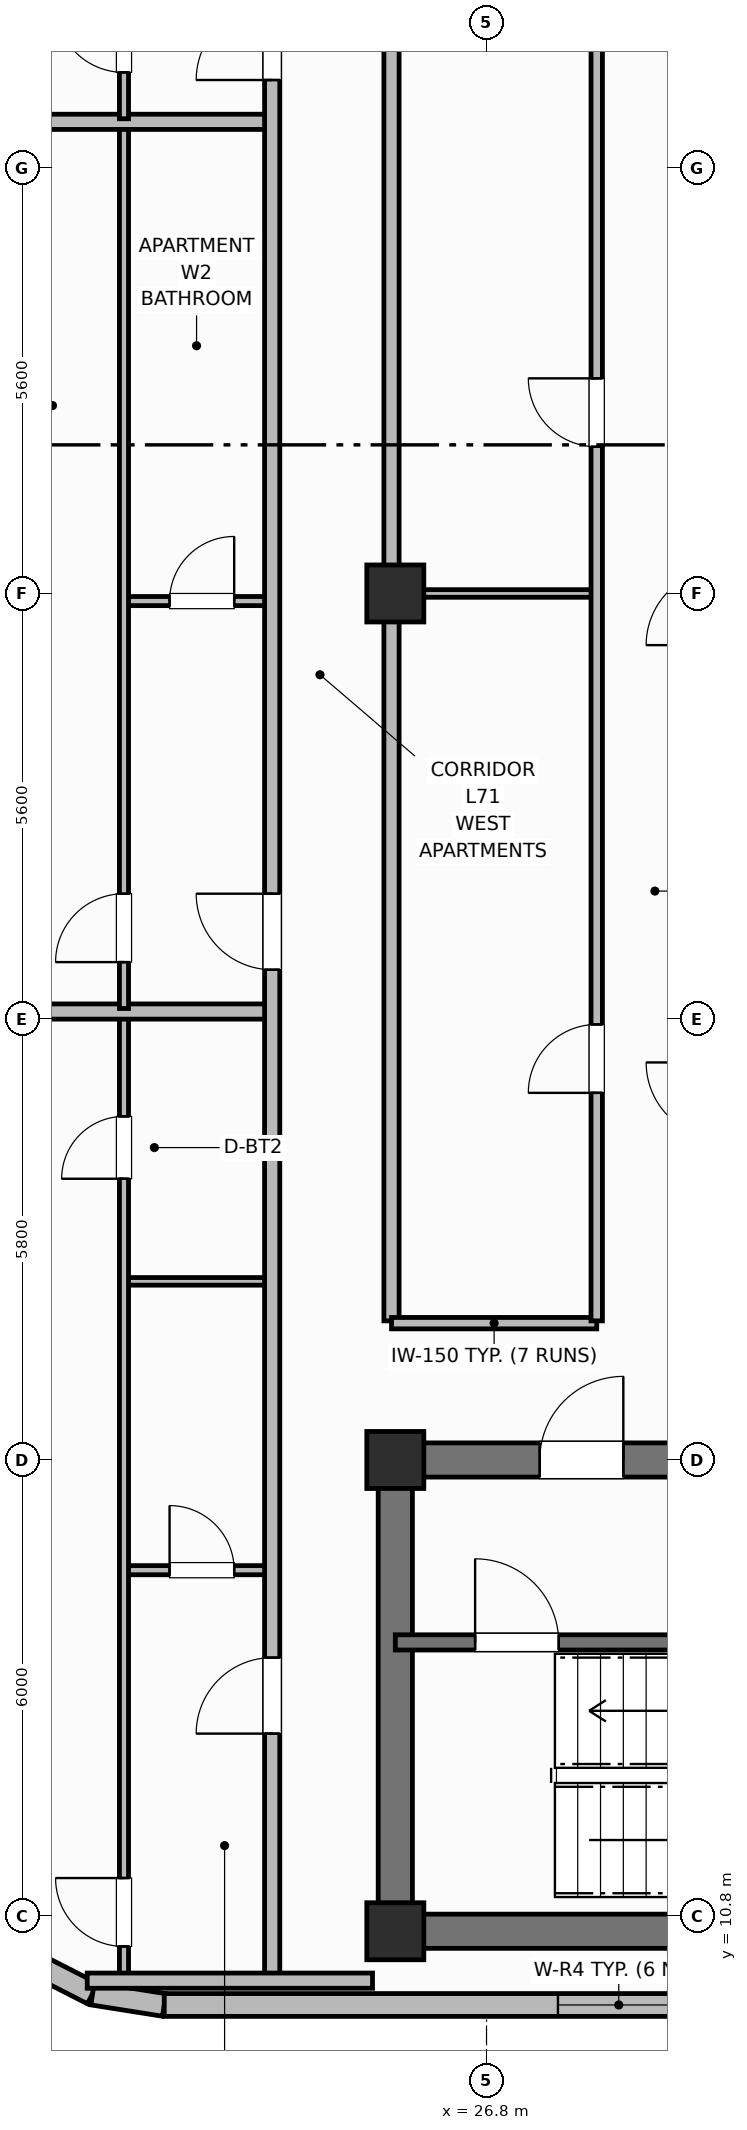
"""IFC4 building model, lengths in metres.
Left out: names, types, materials, properties, quantities, classifications, styles, units other than length and angle.
Written with IfcOpenShell. Run it as: python <this file> out.ifc"""

import sys

from ifc_helpers import new_model, si_unit, direction, frame, frame_2d, origin, origin_2d, place, context, subcontext, project, spatial, rectangle, extrude, element, fill, save


model = new_model("IFC4")
c1 = context("Model", 3, precision=1e-05, world=origin(), true_north=direction((0.0, 1.0)))
c2 = subcontext(c1, "Body", "Model", "MODEL_VIEW")
j1 = project(units=[si_unit("LENGTHUNIT", "METRE"), si_unit("PLANEANGLEUNIT", "RADIAN")], contexts=[c1])
p1 = place(None, origin())
s1 = spatial("IfcSite", under=j1, at=p1, CompositionType="ELEMENT")
p2 = place(p1, origin())
s2 = spatial("IfcBuilding", under=s1, at=p2, CompositionType="ELEMENT")
p3 = place(p2, frame((0.0, 0.0, 282.4)))
s3 = spatial("IfcBuildingStorey", under=s2, at=p3, CompositionType="ELEMENT", Elevation=282.4)
p4 = place(p3, frame((52.8, 10.6, 0.0), z_axis=(0.0, 0.0, 1.0), x_axis=(-1.0, 0.0, 0.0)))
e1 = element("IfcWall", 1, at=p4, inside=s3, PredefinedType="SHEAR", context=c2, shape_type="SweptSolid", body=[
    extrude(rectangle(XDim=27.2, YDim=0.45, at=frame_2d((13.6, 0.0))), origin(), (0.0, 0.0, 1.0), 3.7),
])
p5 = place(p3, frame((25.6, 10.825, 0.0), z_axis=(0.0, 0.0, 1.0), x_axis=(0.0, 1.0, 0.0)))
e2 = element("IfcWall", 2, at=p5, inside=s3, PredefinedType="SHEAR", context=c2, shape_type="SweptSolid", body=[
    extrude(rectangle(XDim=5.75, YDim=0.45, at=frame_2d((2.875, 0.0))), origin(), (0.0, 0.0, 1.0), 3.7),
])
p6 = place(p3, frame((25.6, 16.8, 0.0), z_axis=(0.0, 0.0, 1.0), x_axis=(1.0, 0.0, 0.0)))
e3 = element("IfcWall", 3, at=p6, inside=s3, PredefinedType="SHEAR", context=c2, shape_type="SweptSolid", body=[
    extrude(rectangle(XDim=27.2, YDim=0.45, at=frame_2d((13.6, 0.0))), origin(), (0.0, 0.0, 1.0), 3.7),
])
p7 = place(p6, frame((1.9, 0.0, 0.0)))
e4 = element("IfcOpeningElement", 4, at=p7, cuts=e3, PredefinedType="OPENING", context=c2, shape_type="SweptSolid", body=[
    extrude(rectangle(XDim=1.1, YDim=2.15, at=frame_2d((0.55, 1.075))), frame((0.0, 0.235, 0.0), z_axis=(0.0, -1.0, 0.0), x_axis=(1.0, 0.0, 0.0)), (0.0, 0.0, 1.0), 0.47),
])
p8 = place(p6, frame((13.0, 0.0, 0.0)))
e5 = element("IfcOpeningElement", 5, at=p8, cuts=e3, PredefinedType="OPENING", context=c2, shape_type="SweptSolid", body=[
    extrude(rectangle(XDim=1.2, YDim=2.15, at=frame_2d((0.6, 1.075))), frame((0.0, 0.235, 0.0), z_axis=(0.0, -1.0, 0.0), x_axis=(1.0, 0.0, 0.0)), (0.0, 0.0, 1.0), 0.47),
])
p9 = place(p6, frame((21.6, 0.0, 0.0)))
e6 = element("IfcOpeningElement", 6, at=p9, cuts=e3, PredefinedType="OPENING", context=c2, shape_type="SweptSolid", body=[
    extrude(rectangle(XDim=1.0, YDim=2.15, at=frame_2d((0.5, 1.075))), frame((0.0, 0.235, 0.0), z_axis=(0.0, -1.0, 0.0), x_axis=(1.0, 0.0, 0.0)), (0.0, 0.0, 1.0), 0.47),
])
for number, where, z_axis, x_axis in (
    (7, (25.6, 10.6, 0.0), (0.0, 0.0, 1.0), (1.0, 0.0, 0.0)),
    (8, (25.6, 16.8, 0.0), (0.0, 0.0, 1.0), (1.0, 0.0, 0.0)),
    (9, (25.6, 28.2, 0.0), (0.0, 0.0, 1.0), (1.0, 0.0, 0.0)),
):
    element("IfcColumn", number, at=place(p3, frame(where, z_axis=z_axis, x_axis=x_axis)), inside=s3, PredefinedType="COLUMN", context=c2, shape_type="SweptSolid", body=[
        extrude(rectangle(XDim=0.75, YDim=0.75, at=origin_2d()), origin(), (0.0, 0.0, 1.0), 3.7),
    ])
p10 = place(p3, frame((20.767, 10.212, 0.0), z_axis=(0.0, 0.0, 1.0), x_axis=(0.891023873617, -0.45395644796, 0.0)))
e10 = element("IfcWall", 10, at=p10, inside=s3, PredefinedType="SOLIDWALL", context=c2, shape_type="SweptSolid", body=[
    extrude(rectangle(XDim=0.954, YDim=0.3, at=frame_2d((0.477, 0.0))), origin(), (0.0, 0.0, 1.0), 2.73),
])
p11 = place(p3, frame((21.617, 9.779, 0.0), z_axis=(0.0, 0.0, 1.0), x_axis=(0.987669453596, -0.156553666304, 0.0)))
e11 = element("IfcWall", 11, at=p11, inside=s3, PredefinedType="SOLIDWALL", context=c2, shape_type="SweptSolid", body=[
    extrude(rectangle(XDim=0.954, YDim=0.3, at=frame_2d((0.477, 0.0))), origin(), (0.0, 0.0, 1.0), 2.73),
])
p12 = place(p3, frame((22.56, 9.63, 0.0), z_axis=(0.0, 0.0, 1.0), x_axis=(1.0, 0.0, 0.0)))
e12 = element("IfcWall", 12, at=p12, inside=s3, PredefinedType="SOLIDWALL", context=c2, shape_type="SweptSolid", body=[
    extrude(rectangle(XDim=33.28, YDim=0.3, at=frame_2d((16.64, 0.0))), origin(), (0.0, 0.0, 1.0), 2.73),
])
p13 = place(p12, frame((5.18, 0.0, 0.71)))
e13 = element("IfcOpeningElement", 13, at=p13, cuts=e12, PredefinedType="OPENING", context=c2, shape_type="SweptSolid", body=[
    extrude(rectangle(XDim=1.6, YDim=1.9, at=frame_2d((0.8, 0.95))), frame((0.0, 0.16, 0.0), z_axis=(0.0, -1.0, 0.0), x_axis=(1.0, 0.0, 0.0)), (0.0, 0.0, 1.0), 0.32),
])
p14 = place(p12, frame((8.733, 0.0, 0.71)))
e14 = element("IfcOpeningElement", 14, at=p14, cuts=e12, PredefinedType="OPENING", context=c2, shape_type="SweptSolid", body=[
    extrude(rectangle(XDim=1.6, YDim=1.9, at=frame_2d((0.8, 0.95))), frame((0.0, 0.16, 0.0), z_axis=(0.0, -1.0, 0.0), x_axis=(1.0, 0.0, 0.0)), (0.0, 0.0, 1.0), 0.32),
])
p15 = place(p12, frame((15.84, 0.0, 0.71)))
e15 = element("IfcOpeningElement", 15, at=p15, cuts=e12, PredefinedType="OPENING", context=c2, shape_type="SweptSolid", body=[
    extrude(rectangle(XDim=1.6, YDim=1.9, at=frame_2d((0.8, 0.95))), frame((0.0, 0.16, 0.0), z_axis=(0.0, -1.0, 0.0), x_axis=(1.0, 0.0, 0.0)), (0.0, 0.0, 1.0), 0.32),
])
p16 = place(p12, frame((22.947, 0.0, 0.71)))
e16 = element("IfcOpeningElement", 16, at=p16, cuts=e12, PredefinedType="OPENING", context=c2, shape_type="SweptSolid", body=[
    extrude(rectangle(XDim=1.6, YDim=1.9, at=frame_2d((0.8, 0.95))), frame((0.0, 0.16, 0.0), z_axis=(0.0, -1.0, 0.0), x_axis=(1.0, 0.0, 0.0)), (0.0, 0.0, 1.0), 0.32),
])
p17 = place(p12, frame((26.5, 0.0, 0.71)))
e17 = element("IfcOpeningElement", 17, at=p17, cuts=e12, PredefinedType="OPENING", context=c2, shape_type="SweptSolid", body=[
    extrude(rectangle(XDim=1.6, YDim=1.9, at=frame_2d((0.8, 0.95))), frame((0.0, 0.16, 0.0), z_axis=(0.0, -1.0, 0.0), x_axis=(1.0, 0.0, 0.0)), (0.0, 0.0, 1.0), 0.32),
])
p18 = place(p3, frame((25.6, 14.4, 0.0), z_axis=(0.0, 0.0, 1.0), x_axis=(1.0, 0.0, 0.0)))
e18 = element("IfcWall", 18, at=p18, inside=s3, PredefinedType="SHEAR", context=c2, shape_type="SweptSolid", body=[
    extrude(rectangle(XDim=9.55, YDim=0.2, at=frame_2d((4.775, 0.0))), origin(), (0.0, 0.0, 1.0), 3.7),
])
p19 = place(p18, frame((1.05, 0.0, 0.0)))
e19 = element("IfcOpeningElement", 19, at=p19, cuts=e18, PredefinedType="OPENING", context=c2, shape_type="SweptSolid", body=[
    extrude(rectangle(XDim=1.1, YDim=2.15, at=frame_2d((0.55, 1.075))), frame((0.0, 0.11, 0.0), z_axis=(0.0, -1.0, 0.0), x_axis=(1.0, 0.0, 0.0)), (0.0, 0.0, 1.0), 0.22),
])
p20 = place(p3, frame((25.55, 18.63, 0.0), z_axis=(0.0, 0.0, 1.0), x_axis=(0.0, 1.0, 0.0)))
e20 = element("IfcWall", 20, at=p20, inside=s3, PredefinedType="PARTITIONING", context=c2, shape_type="SweptSolid", body=[
    extrude(rectangle(XDim=19.14, YDim=0.2, at=frame_2d((9.57, 0.0))), origin(), (0.0, 0.0, 1.0), 2.56),
])
p21 = place(p3, frame((25.55, 18.6, 0.0), z_axis=(0.0, 0.0, 1.0), x_axis=(1.0, 0.0, 0.0)))
e21 = element("IfcWall", 21, at=p21, inside=s3, PredefinedType="PARTITIONING", context=c2, shape_type="SweptSolid", body=[
    extrude(rectangle(XDim=2.7, YDim=0.15, at=frame_2d((1.35, 0.0))), origin(), (0.0, 0.0, 1.0), 2.56),
])
p22 = place(p3, frame((25.6, 28.2, 0.0), z_axis=(0.0, 0.0, 1.0), x_axis=(1.0, 0.0, 0.0)))
e22 = element("IfcWall", 22, at=p22, inside=s3, PredefinedType="PARTITIONING", context=c2, shape_type="SweptSolid", body=[
    extrude(rectangle(XDim=2.66, YDim=0.1, at=frame_2d((1.33, 0.0))), origin(), (0.0, 0.0, 1.0), 2.56),
])
p23 = place(p3, frame((28.25, 18.63, 0.0), z_axis=(0.0, 0.0, 1.0), x_axis=(0.0, 1.0, 0.0)))
e23 = element("IfcWall", 23, at=p23, inside=s3, PredefinedType="PARTITIONING", context=c2, shape_type="SweptSolid", body=[
    extrude(rectangle(XDim=19.14, YDim=0.15, at=frame_2d((9.57, 0.0))), origin(), (0.0, 0.0, 1.0), 2.56),
])
p24 = place(p23, frame((3.0, 0.0, 0.0)))
e24 = element("IfcOpeningElement", 24, at=p24, cuts=e23, PredefinedType="OPENING", context=c2, shape_type="SweptSolid", body=[
    extrude(rectangle(XDim=0.9, YDim=2.1, at=frame_2d((0.45, 1.05))), frame((0.0, 0.085, 0.0), z_axis=(0.0, -1.0, 0.0), x_axis=(1.0, 0.0, 0.0)), (0.0, 0.0, 1.0), 0.17),
])
p25 = place(p23, frame((11.5, 0.0, 0.0)))
e25 = element("IfcOpeningElement", 25, at=p25, cuts=e23, PredefinedType="OPENING", context=c2, shape_type="SweptSolid", body=[
    extrude(rectangle(XDim=0.9, YDim=2.1, at=frame_2d((0.45, 1.05))), frame((0.0, 0.085, 0.0), z_axis=(0.0, -1.0, 0.0), x_axis=(1.0, 0.0, 0.0)), (0.0, 0.0, 1.0), 0.17),
])
p26 = place(p3, frame((22.03, 15.35, 0.0), z_axis=(0.0, 0.0, 1.0), x_axis=(1.0, 0.0, 0.0)))
e26 = element("IfcWall", 26, at=p26, inside=s3, PredefinedType="PARTITIONING", context=c2, shape_type="SweptSolid", body=[
    extrude(rectangle(XDim=1.95, YDim=0.12, at=frame_2d((0.975, 0.0))), origin(), (0.0, 0.0, 1.0), 2.56),
])
p27 = place(p26, frame((0.6, 0.0, 0.0)))
e27 = element("IfcOpeningElement", 27, at=p27, cuts=e26, PredefinedType="OPENING", context=c2, shape_type="SweptSolid", body=[
    extrude(rectangle(XDim=0.85, YDim=2.1, at=frame_2d((0.425, 1.05))), frame((0.0, 0.07, 0.0), z_axis=(0.0, -1.0, 0.0), x_axis=(1.0, 0.0, 0.0)), (0.0, 0.0, 1.0), 0.14),
])
p28 = place(p3, frame((22.03, 19.15, 0.0), z_axis=(0.0, 0.0, 1.0), x_axis=(1.0, 0.0, 0.0)))
e28 = element("IfcWall", 28, at=p28, inside=s3, PredefinedType="PARTITIONING", context=c2, shape_type="SweptSolid", body=[
    extrude(rectangle(XDim=1.95, YDim=0.1, at=frame_2d((0.975, 0.0))), origin(), (0.0, 0.0, 1.0), 2.56),
])
p29 = place(p3, frame((22.03, 9.99, 0.0), z_axis=(0.0, 0.0, 1.0), x_axis=(0.0, 1.0, 0.0)))
e29 = element("IfcWall", 29, at=p29, inside=s3, PredefinedType="PARTITIONING", context=c2, shape_type="SweptSolid", body=[
    extrude(rectangle(XDim=12.67, YDim=0.12, at=frame_2d((6.335, 0.0))), origin(), (0.0, 0.0, 1.0), 2.56),
])
p30 = place(p29, frame((0.41, 0.0, 0.0)))
e30 = element("IfcOpeningElement", 30, at=p30, cuts=e29, PredefinedType="OPENING", context=c2, shape_type="SweptSolid", body=[
    extrude(rectangle(XDim=0.9, YDim=2.1, at=frame_2d((0.45, 1.05))), frame((0.0, 0.07, 0.0), z_axis=(0.0, -1.0, 0.0), x_axis=(1.0, 0.0, 0.0)), (0.0, 0.0, 1.0), 0.14),
])
p31 = place(p29, frame((10.51, 0.0, 0.0)))
e31 = element("IfcOpeningElement", 31, at=p31, cuts=e29, PredefinedType="OPENING", context=c2, shape_type="SweptSolid", body=[
    extrude(rectangle(XDim=0.82, YDim=2.08, at=frame_2d((0.41, 1.04))), frame((0.0, 0.07, 0.0), z_axis=(0.0, -1.0, 0.0), x_axis=(1.0, 0.0, 0.0)), (0.0, 0.0, 1.0), 0.14),
])
p32 = place(p3, frame((19.53, 22.7, 0.0), z_axis=(0.0, 0.0, 1.0), x_axis=(1.0, 0.0, 0.0)))
e32 = element("IfcWall", 32, at=p32, inside=s3, PredefinedType="PARTITIONING", context=c2, shape_type="SweptSolid", body=[
    extrude(rectangle(XDim=4.45, YDim=0.2, at=frame_2d((2.225, 0.0))), origin(), (0.0, 0.0, 1.0), 2.56),
])
p33 = place(p3, frame((22.03, 28.1, 0.0), z_axis=(0.0, 0.0, 1.0), x_axis=(1.0, 0.0, 0.0)))
e33 = element("IfcWall", 33, at=p33, inside=s3, PredefinedType="PARTITIONING", context=c2, shape_type="SweptSolid", body=[
    extrude(rectangle(XDim=1.95, YDim=0.12, at=frame_2d((0.975, 0.0))), origin(), (0.0, 0.0, 1.0), 2.56),
])
p34 = place(p33, frame((0.6, 0.0, 0.0)))
e34 = element("IfcOpeningElement", 34, at=p34, cuts=e33, PredefinedType="OPENING", context=c2, shape_type="SweptSolid", body=[
    extrude(rectangle(XDim=0.85, YDim=2.1, at=frame_2d((0.425, 1.05))), frame((0.0, 0.07, 0.0), z_axis=(0.0, -1.0, 0.0), x_axis=(1.0, 0.0, 0.0)), (0.0, 0.0, 1.0), 0.14),
])
p35 = place(p3, frame((22.03, 22.74, 0.0), z_axis=(0.0, 0.0, 1.0), x_axis=(0.0, 1.0, 0.0)))
e35 = element("IfcWall", 35, at=p35, inside=s3, PredefinedType="PARTITIONING", context=c2, shape_type="SweptSolid", body=[
    extrude(rectangle(XDim=11.625, YDim=0.12, at=frame_2d((5.812, 0.0))), origin(), (0.0, 0.0, 1.0), 2.56),
])
p36 = place(p35, frame((0.61, 0.0, 0.0)))
e36 = element("IfcOpeningElement", 36, at=p36, cuts=e35, PredefinedType="OPENING", context=c2, shape_type="SweptSolid", body=[
    extrude(rectangle(XDim=0.9, YDim=2.1, at=frame_2d((0.45, 1.05))), frame((0.0, 0.07, 0.0), z_axis=(0.0, -1.0, 0.0), x_axis=(1.0, 0.0, 0.0)), (0.0, 0.0, 1.0), 0.14),
])
p37 = place(p3, frame((19.53, 34.405, 0.0), z_axis=(0.0, 0.0, 1.0), x_axis=(1.0, 0.0, 0.0)))
e37 = element("IfcWall", 37, at=p37, inside=s3, PredefinedType="PARTITIONING", context=c2, shape_type="SweptSolid", body=[
    extrude(rectangle(XDim=4.45, YDim=0.2, at=frame_2d((2.225, 0.0))), origin(), (0.0, 0.0, 1.0), 2.56),
])
p38 = place(p3, frame((22.03, 34.445, 0.0), z_axis=(0.0, 0.0, 1.0), x_axis=(0.0, 1.0, 0.0)))
e38 = element("IfcWall", 38, at=p38, inside=s3, PredefinedType="PARTITIONING", context=c2, shape_type="SweptSolid", body=[
    extrude(rectangle(XDim=11.965, YDim=0.12, at=frame_2d((5.982, 0.0))), origin(), (0.0, 0.0, 1.0), 2.56),
])
p39 = place(p38, frame((0.61, 0.0, 0.0)))
e39 = element("IfcOpeningElement", 39, at=p39, cuts=e38, PredefinedType="OPENING", context=c2, shape_type="SweptSolid", body=[
    extrude(rectangle(XDim=0.9, YDim=2.1, at=frame_2d((0.45, 1.05))), frame((0.0, 0.07, 0.0), z_axis=(0.0, -1.0, 0.0), x_axis=(1.0, 0.0, 0.0)), (0.0, 0.0, 1.0), 0.14),
])
p40 = place(p38, frame((10.157, 0.0, 0.0)))
e40 = element("IfcOpeningElement", 40, at=p40, cuts=e38, PredefinedType="OPENING", context=c2, shape_type="SweptSolid", body=[
    extrude(rectangle(XDim=0.82, YDim=2.08, at=frame_2d((0.41, 1.04))), frame((0.0, 0.07, 0.0), z_axis=(0.0, -1.0, 0.0), x_axis=(1.0, 0.0, 0.0)), (0.0, 0.0, 1.0), 0.14),
])
p41 = place(p3, frame((23.98, 9.95, 0.0), z_axis=(0.0, 0.0, 1.0), x_axis=(0.0, 1.0, 0.0)))
e41 = element("IfcWall", 41, at=p41, inside=s3, PredefinedType="PARTITIONING", context=c2, shape_type="SweptSolid", body=[
    extrude(rectangle(XDim=36.5, YDim=0.2, at=frame_2d((18.25, 0.0))), origin(), (0.0, 0.0, 1.0), 2.56),
])
p42 = place(p41, frame((3.25, 0.0, 0.0)))
e42 = element("IfcOpeningElement", 42, at=p42, cuts=e41, PredefinedType="OPENING", context=c2, shape_type="SweptSolid", body=[
    extrude(rectangle(XDim=1.0, YDim=2.15, at=frame_2d((0.5, 1.075))), frame((0.0, 0.11, 0.0), z_axis=(0.0, -1.0, 0.0), x_axis=(1.0, 0.0, 0.0)), (0.0, 0.0, 1.0), 0.22),
])
p43 = place(p41, frame((13.3, 0.0, 0.0)))
e43 = element("IfcOpeningElement", 43, at=p43, cuts=e41, PredefinedType="OPENING", context=c2, shape_type="SweptSolid", body=[
    extrude(rectangle(XDim=1.0, YDim=2.15, at=frame_2d((0.5, 1.075))), frame((0.0, 0.11, 0.0), z_axis=(0.0, -1.0, 0.0), x_axis=(1.0, 0.0, 0.0)), (0.0, 0.0, 1.0), 0.22),
])
p44 = place(p41, frame((25.005, 0.0, 0.0)))
e44 = element("IfcOpeningElement", 44, at=p44, cuts=e41, PredefinedType="OPENING", context=c2, shape_type="SweptSolid", body=[
    extrude(rectangle(XDim=1.0, YDim=2.15, at=frame_2d((0.5, 1.075))), frame((0.0, 0.11, 0.0), z_axis=(0.0, -1.0, 0.0), x_axis=(1.0, 0.0, 0.0)), (0.0, 0.0, 1.0), 0.22),
])
p45 = place(p3, frame((21.546, 9.95, 0.0), z_axis=(0.0, 0.0, 1.0), x_axis=(1.0, 0.0, 0.0)))
e45 = element("IfcWall", 45, at=p45, inside=s3, PredefinedType="PARTITIONING", context=c2, shape_type="SweptSolid", body=[
    extrude(rectangle(XDim=3.754, YDim=0.2, at=frame_2d((1.877, 0.0))), origin(), (0.0, 0.0, 1.0), 2.56),
])
p46 = place(p13, origin())
e46 = element("IfcWindow", 46, at=p46, inside=s3, PartitioningType="SINGLE_PANEL", PredefinedType="WINDOW", context=c2, shape_type="SweptSolid", body=[
    extrude(rectangle(XDim=1.6, YDim=1.9, at=frame_2d((0.8, 0.95))), frame((0.0, 0.03, 0.0), z_axis=(0.0, -1.0, 0.0), x_axis=(1.0, 0.0, 0.0)), (0.0, 0.0, 1.0), 0.06),
])
fill(e13, e46)
p47 = place(p19, origin())
e47 = element("IfcDoor", 47, at=p47, inside=s3, OperationType="SINGLE_SWING_LEFT", PredefinedType="DOOR", context=c2, shape_type="SweptSolid", body=[
    extrude(rectangle(XDim=1.1, YDim=2.15, at=frame_2d((0.55, 1.075))), frame((0.0, 0.025, 0.0), z_axis=(0.0, -1.0, 0.0), x_axis=(1.0, 0.0, 0.0)), (0.0, 0.0, 1.0), 0.05),
])
fill(e19, e47)
p48 = place(p24, origin())
e48 = element("IfcDoor", 48, at=p48, inside=s3, OperationType="SINGLE_SWING_LEFT", PredefinedType="DOOR", context=c2, shape_type="SweptSolid", body=[
    extrude(rectangle(XDim=0.9, YDim=2.1, at=frame_2d((0.45, 1.05))), frame((0.0, 0.025, 0.0), z_axis=(0.0, -1.0, 0.0), x_axis=(1.0, 0.0, 0.0)), (0.0, 0.0, 1.0), 0.05),
])
fill(e24, e48)
p49 = place(p25, origin())
e49 = element("IfcDoor", 49, at=p49, inside=s3, OperationType="SINGLE_SWING_RIGHT", PredefinedType="DOOR", context=c2, shape_type="SweptSolid", body=[
    extrude(rectangle(XDim=0.9, YDim=2.1, at=frame_2d((0.45, 1.05))), frame((0.0, 0.025, 0.0), z_axis=(0.0, -1.0, 0.0), x_axis=(1.0, 0.0, 0.0)), (0.0, 0.0, 1.0), 0.05),
])
fill(e25, e49)
p50 = place(p27, origin())
e50 = element("IfcDoor", 50, at=p50, inside=s3, OperationType="SINGLE_SWING_LEFT", PredefinedType="DOOR", context=c2, shape_type="SweptSolid", body=[
    extrude(rectangle(XDim=0.85, YDim=2.1, at=frame_2d((0.425, 1.05))), frame((0.0, 0.025, 0.0), z_axis=(0.0, -1.0, 0.0), x_axis=(1.0, 0.0, 0.0)), (0.0, 0.0, 1.0), 0.05),
])
fill(e27, e50)
p51 = place(p30, origin())
e51 = element("IfcDoor", 51, at=p51, inside=s3, OperationType="SINGLE_SWING_RIGHT", PredefinedType="DOOR", context=c2, shape_type="SweptSolid", body=[
    extrude(rectangle(XDim=0.9, YDim=2.1, at=frame_2d((0.45, 1.05))), frame((0.0, 0.025, 0.0), z_axis=(0.0, -1.0, 0.0), x_axis=(1.0, 0.0, 0.0)), (0.0, 0.0, 1.0), 0.05),
])
fill(e30, e51)
p52 = place(p31, origin())
e52 = element("IfcDoor", 52, at=p52, inside=s3, OperationType="SINGLE_SWING_LEFT", PredefinedType="DOOR", context=c2, shape_type="SweptSolid", body=[
    extrude(rectangle(XDim=0.82, YDim=2.08, at=frame_2d((0.41, 1.04))), frame((0.0, 0.025, 0.0), z_axis=(0.0, -1.0, 0.0), x_axis=(1.0, 0.0, 0.0)), (0.0, 0.0, 1.0), 0.05),
])
fill(e31, e52)
p53 = place(p34, origin())
e53 = element("IfcDoor", 53, at=p53, inside=s3, OperationType="SINGLE_SWING_RIGHT", PredefinedType="DOOR", context=c2, shape_type="SweptSolid", body=[
    extrude(rectangle(XDim=0.85, YDim=2.1, at=frame_2d((0.425, 1.05))), frame((0.0, 0.025, 0.0), z_axis=(0.0, -1.0, 0.0), x_axis=(1.0, 0.0, 0.0)), (0.0, 0.0, 1.0), 0.05),
])
fill(e34, e53)
p54 = place(p36, origin())
e54 = element("IfcDoor", 54, at=p54, inside=s3, OperationType="SINGLE_SWING_LEFT", PredefinedType="DOOR", context=c2, shape_type="SweptSolid", body=[
    extrude(rectangle(XDim=0.9, YDim=2.1, at=frame_2d((0.45, 1.05))), frame((0.0, 0.025, 0.0), z_axis=(0.0, -1.0, 0.0), x_axis=(1.0, 0.0, 0.0)), (0.0, 0.0, 1.0), 0.05),
])
fill(e36, e54)
p55 = place(p39, origin())
e55 = element("IfcDoor", 55, at=p55, inside=s3, OperationType="SINGLE_SWING_RIGHT", PredefinedType="DOOR", context=c2, shape_type="SweptSolid", body=[
    extrude(rectangle(XDim=0.9, YDim=2.1, at=frame_2d((0.45, 1.05))), frame((0.0, 0.025, 0.0), z_axis=(0.0, -1.0, 0.0), x_axis=(1.0, 0.0, 0.0)), (0.0, 0.0, 1.0), 0.05),
])
fill(e39, e55)
p56 = place(p42, origin())
e56 = element("IfcDoor", 56, at=p56, inside=s3, OperationType="SINGLE_SWING_LEFT", PredefinedType="DOOR", context=c2, shape_type="SweptSolid", body=[
    extrude(rectangle(XDim=1.0, YDim=2.15, at=frame_2d((0.5, 1.075))), frame((0.0, 0.025, 0.0), z_axis=(0.0, -1.0, 0.0), x_axis=(1.0, 0.0, 0.0)), (0.0, 0.0, 1.0), 0.05),
])
fill(e42, e56)
p57 = place(p43, origin())
e57 = element("IfcDoor", 57, at=p57, inside=s3, OperationType="SINGLE_SWING_RIGHT", PredefinedType="DOOR", context=c2, shape_type="SweptSolid", body=[
    extrude(rectangle(XDim=1.0, YDim=2.15, at=frame_2d((0.5, 1.075))), frame((0.0, 0.025, 0.0), z_axis=(0.0, -1.0, 0.0), x_axis=(1.0, 0.0, 0.0)), (0.0, 0.0, 1.0), 0.05),
])
fill(e43, e57)
p58 = place(p44, origin())
e58 = element("IfcDoor", 58, at=p58, inside=s3, OperationType="SINGLE_SWING_LEFT", PredefinedType="DOOR", context=c2, shape_type="SweptSolid", body=[
    extrude(rectangle(XDim=1.0, YDim=2.15, at=frame_2d((0.5, 1.075))), frame((0.0, 0.025, 0.0), z_axis=(0.0, -1.0, 0.0), x_axis=(1.0, 0.0, 0.0)), (0.0, 0.0, 1.0), 0.05),
])
fill(e44, e58)
p59 = place(p7, origin())
e59 = element("IfcDoor", 59, at=p59, inside=s3, OperationType="SINGLE_SWING_RIGHT", PredefinedType="DOOR", context=c2, shape_type="SweptSolid", body=[
    extrude(rectangle(XDim=1.1, YDim=2.15, at=frame_2d((0.55, 1.075))), frame((0.0, 0.025, 0.0), z_axis=(0.0, -1.0, 0.0), x_axis=(1.0, 0.0, 0.0)), (0.0, 0.0, 1.0), 0.05),
])
fill(e4, e59)
save(model, sys.argv[1])
